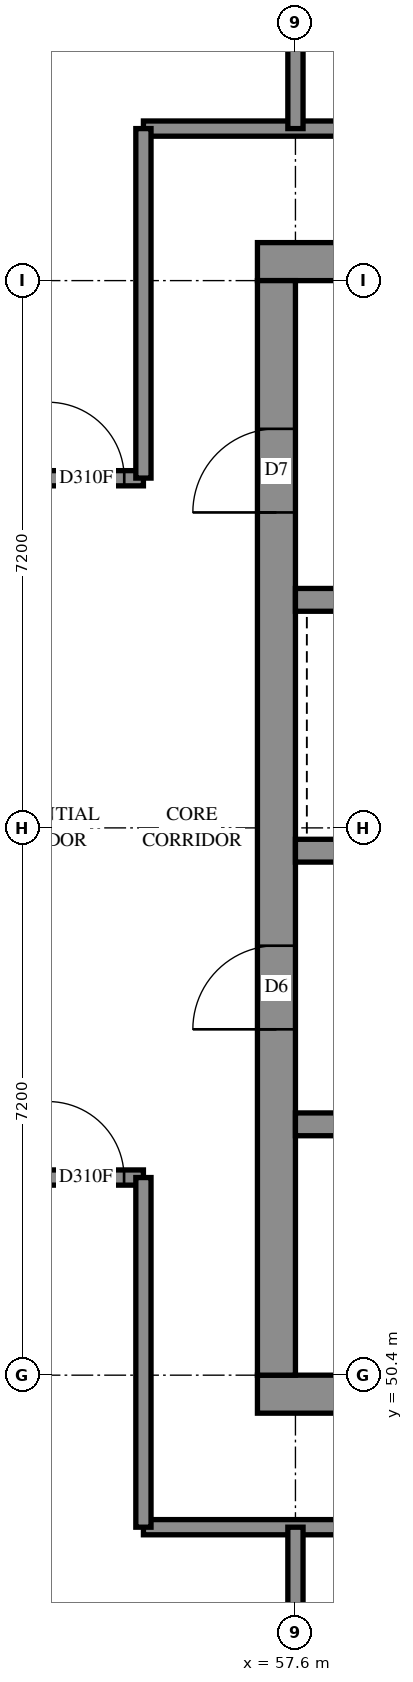
"""IFC4 building model, lengths in metres.
Left out: names, types, materials, properties, quantities, classifications, styles, units other than length and angle.
Written with IfcOpenShell. Run it as: python <this file> out.ifc"""

import sys

from ifc_helpers import new_model, si_unit, direction, frame, frame_2d, origin, place, context, subcontext, project, spatial, rectangle, extrude, element, fill, save


model = new_model("IFC4")
c1 = context("Model", 3, precision=1e-05, world=origin(), true_north=direction((0.0, 1.0)))
c2 = subcontext(c1, "Body", "Model", "MODEL_VIEW")
j1 = project(units=[si_unit("LENGTHUNIT", "METRE"), si_unit("PLANEANGLEUNIT", "RADIAN")], contexts=[c1])
p1 = place(None, origin())
s1 = spatial("IfcSite", under=j1, at=p1, CompositionType="ELEMENT")
p2 = place(p1, origin())
s2 = spatial("IfcBuilding", under=s1, at=p2, CompositionType="ELEMENT")
p3 = place(p2, frame((0.0, 0.0, 189.6)))
s3 = spatial("IfcBuildingStorey", under=s2, at=p3, CompositionType="ELEMENT", Elevation=189.6)
p4 = place(p3, frame((57.1, 50.15, -0.3), z_axis=(0.0, 0.0, 1.0), x_axis=(1.0, 0.0, 0.0)))
e1 = element("IfcWall", 1, at=p4, inside=s3, PredefinedType="SHEAR", context=c2, shape_type="SweptSolid", body=[
    extrude(rectangle(XDim=15.4, YDim=0.5, at=frame_2d((7.7, 0.0))), origin(), (0.0, 0.0, 1.0), 2.7),
])
p5 = place(p3, frame((57.1, 65.05, -0.3), z_axis=(0.0, 0.0, 1.0), x_axis=(1.0, 0.0, 0.0)))
e2 = element("IfcWall", 2, at=p5, inside=s3, PredefinedType="SHEAR", context=c2, shape_type="SweptSolid", body=[
    extrude(rectangle(XDim=15.4, YDim=0.5, at=frame_2d((7.7, 0.0))), origin(), (0.0, 0.0, 1.0), 2.7),
])
p6 = place(p5, frame((10.5, 0.0, 0.3)))
e3 = element("IfcOpeningElement", 3, at=p6, cuts=e2, PredefinedType="OPENING", context=c2, shape_type="SweptSolid", body=[
    extrude(rectangle(XDim=0.8, YDim=2.1, at=frame_2d((0.4, 1.05))), frame((0.0, 0.26, 0.0), z_axis=(0.0, -1.0, 0.0), x_axis=(1.0, 0.0, 0.0)), (0.0, 0.0, 1.0), 0.52),
])
p7 = place(p3, frame((57.35, 50.4, -0.3), z_axis=(0.0, 0.0, 1.0), x_axis=(0.0, 1.0, 0.0)))
e4 = element("IfcWall", 4, at=p7, inside=s3, PredefinedType="SHEAR", context=c2, shape_type="SweptSolid", body=[
    extrude(rectangle(XDim=14.4, YDim=0.5, at=frame_2d((7.2, 0.0))), origin(), (0.0, 0.0, 1.0), 2.7),
])
p8 = place(p7, frame((4.55, 0.0, 0.3)))
e5 = element("IfcOpeningElement", 5, at=p8, cuts=e4, PredefinedType="OPENING", context=c2, shape_type="SweptSolid", body=[
    extrude(rectangle(XDim=1.1, YDim=2.1, at=frame_2d((0.55, 1.05))), frame((0.0, 0.26, 0.0), z_axis=(0.0, -1.0, 0.0), x_axis=(1.0, 0.0, 0.0)), (0.0, 0.0, 1.0), 0.52),
])
p9 = place(p7, frame((11.35, 0.0, 0.3)))
e6 = element("IfcOpeningElement", 6, at=p9, cuts=e4, PredefinedType="OPENING", context=c2, shape_type="SweptSolid", body=[
    extrude(rectangle(XDim=1.1, YDim=2.1, at=frame_2d((0.55, 1.05))), frame((0.0, 0.26, 0.0), z_axis=(0.0, -1.0, 0.0), x_axis=(1.0, 0.0, 0.0)), (0.0, 0.0, 1.0), 0.52),
])
p10 = place(p3, frame((57.6, 53.7, 0.0), z_axis=(0.0, 0.0, 1.0), x_axis=(1.0, 0.0, 0.0)))
e7 = element("IfcWall", 7, at=p10, inside=s3, PredefinedType="SOLIDWALL", context=c2, shape_type="SweptSolid", body=[
    extrude(rectangle(XDim=14.4, YDim=0.3, at=frame_2d((7.2, 0.0))), origin(), (0.0, 0.0, 1.0), 3.1),
])
p11 = place(p10, frame((1.35, 0.0, 0.0)))
e8 = element("IfcOpeningElement", 8, at=p11, cuts=e7, PredefinedType="OPENING", context=c2, shape_type="SweptSolid", body=[
    extrude(rectangle(XDim=0.9, YDim=2.1, at=frame_2d((0.45, 1.05))), frame((0.0, 0.16, 0.0), z_axis=(0.0, -1.0, 0.0), x_axis=(1.0, 0.0, 0.0)), (0.0, 0.0, 1.0), 0.32),
])
p12 = place(p10, frame((4.95, 0.0, 0.0)))
e9 = element("IfcOpeningElement", 9, at=p12, cuts=e7, PredefinedType="OPENING", context=c2, shape_type="SweptSolid", body=[
    extrude(rectangle(XDim=0.9, YDim=2.1, at=frame_2d((0.45, 1.05))), frame((0.0, 0.16, 0.0), z_axis=(0.0, -1.0, 0.0), x_axis=(1.0, 0.0, 0.0)), (0.0, 0.0, 1.0), 0.32),
])
p13 = place(p10, frame((8.55, 0.0, 0.0)))
e10 = element("IfcOpeningElement", 10, at=p13, cuts=e7, PredefinedType="OPENING", context=c2, shape_type="SweptSolid", body=[
    extrude(rectangle(XDim=0.9, YDim=2.1, at=frame_2d((0.45, 1.05))), frame((0.0, 0.16, 0.0), z_axis=(0.0, -1.0, 0.0), x_axis=(1.0, 0.0, 0.0)), (0.0, 0.0, 1.0), 0.32),
])
p14 = place(p10, frame((12.05, 0.0, 0.0)))
e11 = element("IfcOpeningElement", 11, at=p14, cuts=e7, PredefinedType="OPENING", context=c2, shape_type="SweptSolid", body=[
    extrude(rectangle(XDim=1.1, YDim=2.1, at=frame_2d((0.55, 1.05))), frame((0.0, 0.16, 0.0), z_axis=(0.0, -1.0, 0.0), x_axis=(1.0, 0.0, 0.0)), (0.0, 0.0, 1.0), 0.32),
])
p15 = place(p3, frame((57.6, 57.3, 0.0), z_axis=(0.0, 0.0, 1.0), x_axis=(1.0, 0.0, 0.0)))
e12 = element("IfcWall", 12, at=p15, inside=s3, PredefinedType="SOLIDWALL", context=c2, shape_type="SweptSolid", body=[
    extrude(rectangle(XDim=14.4, YDim=0.3, at=frame_2d((7.2, 0.0))), origin(), (0.0, 0.0, 1.0), 3.1),
])
p16 = place(p15, frame((1.25, 0.0, 0.0)))
e13 = element("IfcOpeningElement", 13, at=p16, cuts=e12, PredefinedType="OPENING", context=c2, shape_type="SweptSolid", body=[
    extrude(rectangle(XDim=1.1, YDim=2.1, at=frame_2d((0.55, 1.05))), frame((0.0, 0.16, 0.0), z_axis=(0.0, -1.0, 0.0), x_axis=(1.0, 0.0, 0.0)), (0.0, 0.0, 1.0), 0.32),
])
p17 = place(p15, frame((4.85, 0.0, 0.0)))
e14 = element("IfcOpeningElement", 14, at=p17, cuts=e12, PredefinedType="OPENING", context=c2, shape_type="SweptSolid", body=[
    extrude(rectangle(XDim=1.1, YDim=2.1, at=frame_2d((0.55, 1.05))), frame((0.0, 0.16, 0.0), z_axis=(0.0, -1.0, 0.0), x_axis=(1.0, 0.0, 0.0)), (0.0, 0.0, 1.0), 0.32),
])
p18 = place(p15, frame((8.45, 0.0, 0.0)))
e15 = element("IfcOpeningElement", 15, at=p18, cuts=e12, PredefinedType="OPENING", context=c2, shape_type="SweptSolid", body=[
    extrude(rectangle(XDim=1.1, YDim=2.1, at=frame_2d((0.55, 1.05))), frame((0.0, 0.16, 0.0), z_axis=(0.0, -1.0, 0.0), x_axis=(1.0, 0.0, 0.0)), (0.0, 0.0, 1.0), 0.32),
])
p19 = place(p15, frame((12.05, 0.0, 0.0)))
e16 = element("IfcOpeningElement", 16, at=p19, cuts=e12, PredefinedType="OPENING", context=c2, shape_type="SweptSolid", body=[
    extrude(rectangle(XDim=1.1, YDim=2.1, at=frame_2d((0.55, 1.05))), frame((0.0, 0.16, 0.0), z_axis=(0.0, -1.0, 0.0), x_axis=(1.0, 0.0, 0.0)), (0.0, 0.0, 1.0), 0.32),
])
p20 = place(p3, frame((57.6, 60.6, 0.0), z_axis=(0.0, 0.0, 1.0), x_axis=(1.0, 0.0, 0.0)))
e17 = element("IfcWall", 17, at=p20, inside=s3, PredefinedType="SOLIDWALL", context=c2, shape_type="SweptSolid", body=[
    extrude(rectangle(XDim=7.2, YDim=0.3, at=frame_2d((3.6, 0.0))), origin(), (0.0, 0.0, 1.0), 3.1),
])
p21 = place(p3, frame((55.6, 48.4, 0.0), z_axis=(0.0, 0.0, 1.0), x_axis=(1.0, 0.0, 0.0)))
e18 = element("IfcWall", 18, at=p21, inside=s3, PredefinedType="PARTITIONING", context=c2, shape_type="SweptSolid", body=[
    extrude(rectangle(XDim=18.4, YDim=0.2, at=frame_2d((9.2, 0.0))), origin(), (0.0, 0.0, 1.0), 3.1),
])
p22 = place(p21, frame((5.862, 0.0, 0.0)))
e19 = element("IfcOpeningElement", 19, at=p22, cuts=e18, PredefinedType="OPENING", context=c2, shape_type="SweptSolid", body=[
    extrude(rectangle(XDim=1.0, YDim=2.1, at=frame_2d((0.5, 1.05))), frame((0.0, 0.11, 0.0), z_axis=(0.0, -1.0, 0.0), x_axis=(1.0, 0.0, 0.0)), (0.0, 0.0, 1.0), 0.22),
])
p23 = place(p21, frame((11.5, 0.0, 0.0)))
e20 = element("IfcOpeningElement", 20, at=p23, cuts=e18, PredefinedType="OPENING", context=c2, shape_type="SweptSolid", body=[
    extrude(rectangle(XDim=0.9, YDim=2.1, at=frame_2d((0.45, 1.05))), frame((0.0, 0.11, 0.0), z_axis=(0.0, -1.0, 0.0), x_axis=(1.0, 0.0, 0.0)), (0.0, 0.0, 1.0), 0.22),
])
p24 = place(p21, frame((13.2, 0.0, 0.0)))
e21 = element("IfcOpeningElement", 21, at=p24, cuts=e18, PredefinedType="OPENING", context=c2, shape_type="SweptSolid", body=[
    extrude(rectangle(XDim=0.9, YDim=2.1, at=frame_2d((0.45, 1.05))), frame((0.0, 0.11, 0.0), z_axis=(0.0, -1.0, 0.0), x_axis=(1.0, 0.0, 0.0)), (0.0, 0.0, 1.0), 0.22),
])
p25 = place(p3, frame((55.6, 66.8, 0.0), z_axis=(0.0, 0.0, 1.0), x_axis=(1.0, 0.0, 0.0)))
e22 = element("IfcWall", 22, at=p25, inside=s3, PredefinedType="PARTITIONING", context=c2, shape_type="SweptSolid", body=[
    extrude(rectangle(XDim=18.4, YDim=0.2, at=frame_2d((9.2, 0.0))), origin(), (0.0, 0.0, 1.0), 3.1),
])
p26 = place(p25, frame((5.886, 0.0, 0.0)))
e23 = element("IfcOpeningElement", 23, at=p26, cuts=e22, PredefinedType="OPENING", context=c2, shape_type="SweptSolid", body=[
    extrude(rectangle(XDim=1.0, YDim=2.1, at=frame_2d((0.5, 1.05))), frame((0.0, 0.11, 0.0), z_axis=(0.0, -1.0, 0.0), x_axis=(1.0, 0.0, 0.0)), (0.0, 0.0, 1.0), 0.22),
])
p27 = place(p25, frame((13.389, 0.0, 0.0)))
e24 = element("IfcOpeningElement", 24, at=p27, cuts=e22, PredefinedType="OPENING", context=c2, shape_type="SweptSolid", body=[
    extrude(rectangle(XDim=1.0, YDim=2.1, at=frame_2d((0.5, 1.05))), frame((0.0, 0.11, 0.0), z_axis=(0.0, -1.0, 0.0), x_axis=(1.0, 0.0, 0.0)), (0.0, 0.0, 1.0), 0.22),
])
p28 = place(p3, frame((40.602, 62.2, 0.0), z_axis=(0.0, 0.0, 1.0), x_axis=(1.0, 0.0, 0.0)))
e25 = element("IfcWall", 25, at=p28, inside=s3, PredefinedType="PARTITIONING", context=c2, shape_type="SweptSolid", body=[
    extrude(rectangle(XDim=14.998, YDim=0.2, at=frame_2d((7.499, 0.0))), origin(), (0.0, 0.0, 1.0), 3.1),
])
p29 = place(p28, frame((1.306, 0.0, 0.0)))
e26 = element("IfcOpeningElement", 26, at=p29, cuts=e25, PredefinedType="OPENING", context=c2, shape_type="SweptSolid", body=[
    extrude(rectangle(XDim=0.9, YDim=2.1, at=frame_2d((0.45, 1.05))), frame((0.0, 0.11, 0.0), z_axis=(0.0, -1.0, 0.0), x_axis=(1.0, 0.0, 0.0)), (0.0, 0.0, 1.0), 0.22),
])
p30 = place(p28, frame((8.548, 0.0, 0.0)))
e27 = element("IfcOpeningElement", 27, at=p30, cuts=e25, PredefinedType="OPENING", context=c2, shape_type="SweptSolid", body=[
    extrude(rectangle(XDim=0.9, YDim=2.1, at=frame_2d((0.45, 1.05))), frame((0.0, 0.11, 0.0), z_axis=(0.0, -1.0, 0.0), x_axis=(1.0, 0.0, 0.0)), (0.0, 0.0, 1.0), 0.22),
])
p31 = place(p28, frame((10.198, 0.0, 0.0)))
e28 = element("IfcOpeningElement", 28, at=p31, cuts=e25, PredefinedType="OPENING", context=c2, shape_type="SweptSolid", body=[
    extrude(rectangle(XDim=0.9, YDim=2.1, at=frame_2d((0.45, 1.05))), frame((0.0, 0.11, 0.0), z_axis=(0.0, -1.0, 0.0), x_axis=(1.0, 0.0, 0.0)), (0.0, 0.0, 1.0), 0.22),
])
p32 = place(p28, frame((13.746, 0.0, 0.0)))
e29 = element("IfcOpeningElement", 29, at=p32, cuts=e25, PredefinedType="OPENING", context=c2, shape_type="SweptSolid", body=[
    extrude(rectangle(XDim=1.0, YDim=2.1, at=frame_2d((0.5, 1.05))), frame((0.0, 0.11, 0.0), z_axis=(0.0, -1.0, 0.0), x_axis=(1.0, 0.0, 0.0)), (0.0, 0.0, 1.0), 0.22),
])
p33 = place(p3, frame((50.4, 53.0, 0.0), z_axis=(0.0, 0.0, 1.0), x_axis=(1.0, 0.0, 0.0)))
e30 = element("IfcWall", 30, at=p33, inside=s3, PredefinedType="PARTITIONING", context=c2, shape_type="SweptSolid", body=[
    extrude(rectangle(XDim=5.2, YDim=0.2, at=frame_2d((2.6, 0.0))), origin(), (0.0, 0.0, 1.0), 3.1),
])
p34 = place(p33, frame((0.4, 0.0, 0.0)))
e31 = element("IfcOpeningElement", 31, at=p34, cuts=e30, PredefinedType="OPENING", context=c2, shape_type="SweptSolid", body=[
    extrude(rectangle(XDim=0.9, YDim=2.1, at=frame_2d((0.45, 1.05))), frame((0.0, 0.11, 0.0), z_axis=(0.0, -1.0, 0.0), x_axis=(1.0, 0.0, 0.0)), (0.0, 0.0, 1.0), 0.22),
])
p35 = place(p33, frame((3.946, 0.0, 0.0)))
e32 = element("IfcOpeningElement", 32, at=p35, cuts=e30, PredefinedType="OPENING", context=c2, shape_type="SweptSolid", body=[
    extrude(rectangle(XDim=1.0, YDim=2.1, at=frame_2d((0.5, 1.05))), frame((0.0, 0.11, 0.0), z_axis=(0.0, -1.0, 0.0), x_axis=(1.0, 0.0, 0.0)), (0.0, 0.0, 1.0), 0.22),
])
for number, where, z_axis, x_axis in (
    (33, (57.6, 43.6, 0.0), (0.0, 0.0, 1.0), (0.0, 1.0, 0.0)),
    (34, (57.6, 66.8, 0.0), (0.0, 0.0, 1.0), (0.0, 1.0, 0.0)),
):
    element("IfcWall", number, at=place(p3, frame(where, z_axis=z_axis, x_axis=x_axis)), inside=s3, PredefinedType="PARTITIONING", context=c2, shape_type="SweptSolid", body=[
        extrude(rectangle(XDim=4.8, YDim=0.2, at=frame_2d((2.4, 0.0))), origin(), (0.0, 0.0, 1.0), 3.1),
    ])
p36 = place(p3, frame((55.6, 48.4, 0.0), z_axis=(0.0, 0.0, 1.0), x_axis=(0.0, 1.0, 0.0)))
e35 = element("IfcWall", 35, at=p36, inside=s3, PredefinedType="PARTITIONING", context=c2, shape_type="SweptSolid", body=[
    extrude(rectangle(XDim=4.6, YDim=0.2, at=frame_2d((2.3, 0.0))), origin(), (0.0, 0.0, 1.0), 3.1),
])
p37 = place(p3, frame((55.6, 62.202, 0.0), z_axis=(0.0, 0.0, 1.0), x_axis=(0.0, 1.0, 0.0)))
e36 = element("IfcWall", 36, at=p37, inside=s3, PredefinedType="PARTITIONING", context=c2, shape_type="SweptSolid", body=[
    extrude(rectangle(XDim=4.598, YDim=0.2, at=frame_2d((2.299, 0.0))), origin(), (0.0, 0.0, 1.0), 3.1),
])
p38 = place(p8, origin())
e37 = element("IfcDoor", 37, at=p38, inside=s3, OperationType="DOUBLE_DOOR_SINGLE_SWING", PredefinedType="DOOR", context=c2, shape_type="SweptSolid", body=[
    extrude(rectangle(XDim=1.1, YDim=2.1, at=frame_2d((0.55, 1.05))), frame((0.0, 0.025, 0.0), z_axis=(0.0, -1.0, 0.0), x_axis=(1.0, 0.0, 0.0)), (0.0, 0.0, 1.0), 0.05),
])
fill(e5, e37)
p39 = place(p9, origin())
e38 = element("IfcDoor", 38, at=p39, inside=s3, OperationType="SINGLE_SWING_LEFT", PredefinedType="DOOR", context=c2, shape_type="SweptSolid", body=[
    extrude(rectangle(XDim=1.1, YDim=2.1, at=frame_2d((0.55, 1.05))), frame((0.0, 0.025, 0.0), z_axis=(0.0, -1.0, 0.0), x_axis=(1.0, 0.0, 0.0)), (0.0, 0.0, 1.0), 0.05),
])
fill(e6, e38)
p40 = place(p32, origin())
e39 = element("IfcDoor", 39, at=p40, inside=s3, OperationType="SINGLE_SWING_LEFT", PredefinedType="DOOR", context=c2, shape_type="SweptSolid", body=[
    extrude(rectangle(XDim=1.0, YDim=2.1, at=frame_2d((0.5, 1.05))), frame((0.0, 0.025, 0.0), z_axis=(0.0, -1.0, 0.0), x_axis=(1.0, 0.0, 0.0)), (0.0, 0.0, 1.0), 0.05),
])
fill(e29, e39)
p41 = place(p35, origin())
e40 = element("IfcDoor", 40, at=p41, inside=s3, OperationType="SINGLE_SWING_RIGHT", PredefinedType="DOOR", context=c2, shape_type="SweptSolid", body=[
    extrude(rectangle(XDim=1.0, YDim=2.1, at=frame_2d((0.5, 1.05))), frame((0.0, 0.025, 0.0), z_axis=(0.0, -1.0, 0.0), x_axis=(1.0, 0.0, 0.0)), (0.0, 0.0, 1.0), 0.05),
])
fill(e32, e40)
save(model, sys.argv[1])
